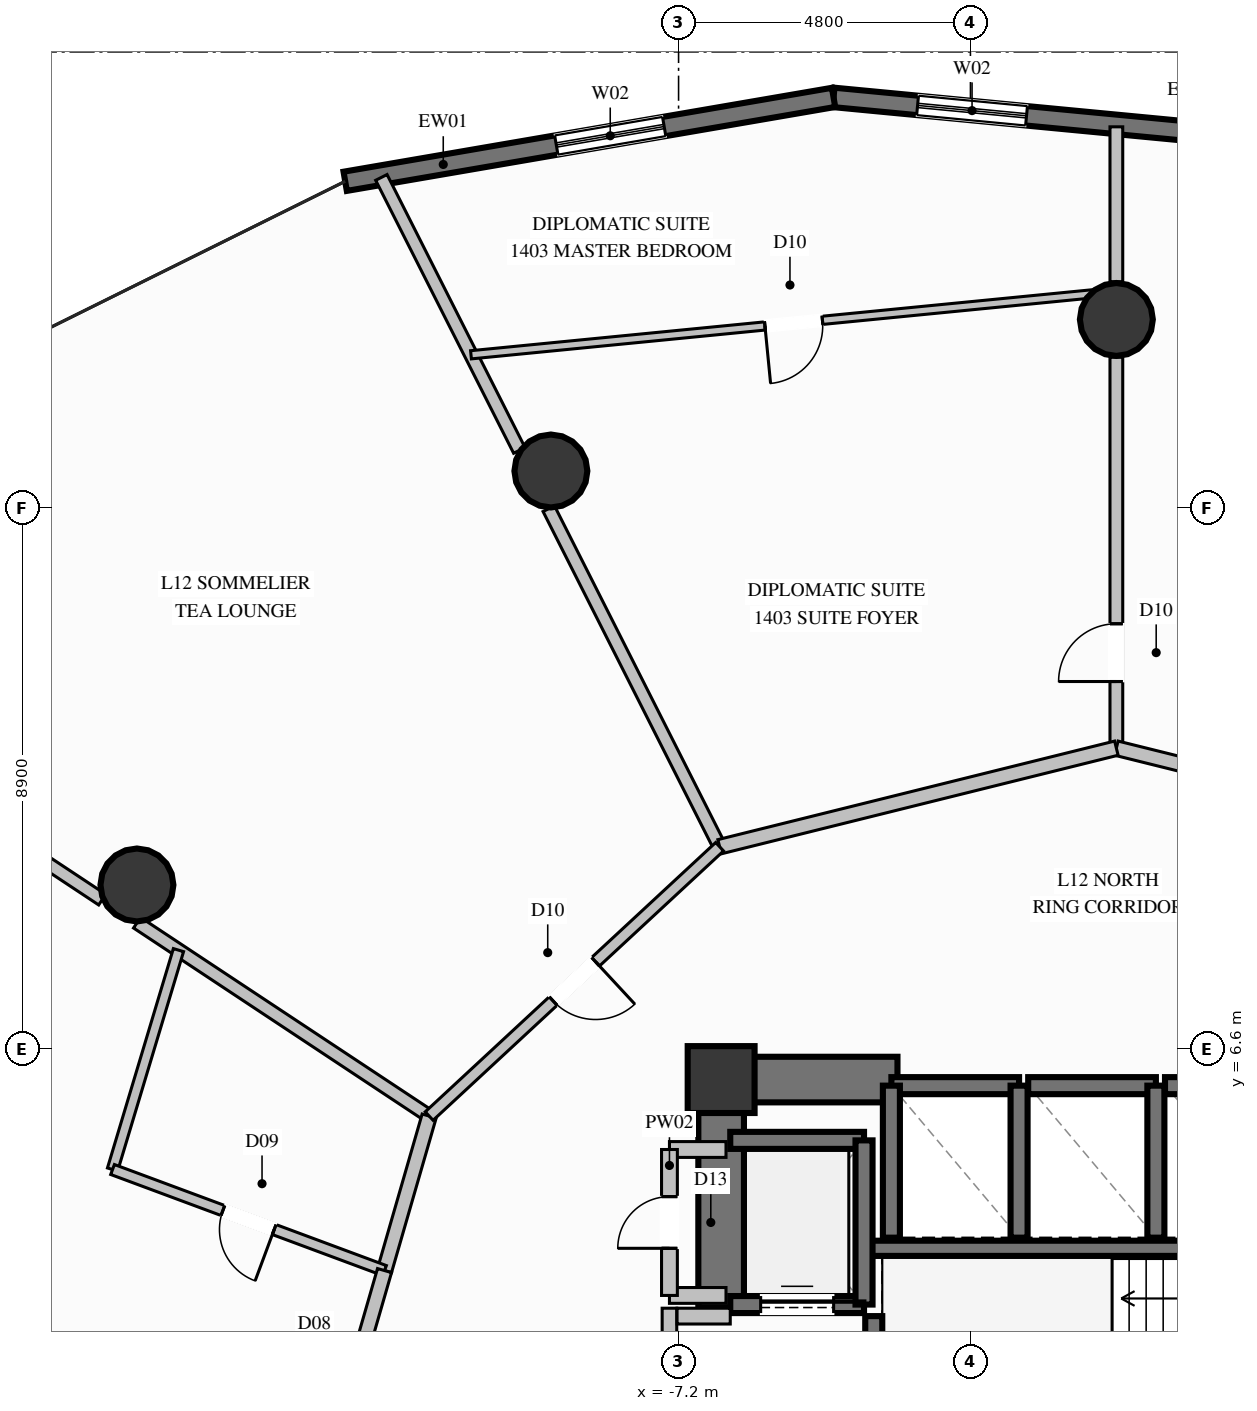
"""IFC4 building model, lengths in metres.
Left out: names, types, materials, properties, quantities, classifications, styles, units other than length and angle.
Written with IfcOpenShell. Run it as: python <this file> out.ifc"""

import sys

from ifc_helpers import new_model, si_unit, direction, frame, frame_2d, origin, origin_2d, place, context, subcontext, project, spatial, rectangle, circle, extrude, element, fill, save


model = new_model("IFC4")
c1 = context("Model", 3, precision=1e-05, world=origin(), true_north=direction((0.0, 1.0)))
c2 = subcontext(c1, "Body", "Model", "MODEL_VIEW")
j1 = project(units=[si_unit("LENGTHUNIT", "METRE"), si_unit("PLANEANGLEUNIT", "RADIAN")], contexts=[c1])
p1 = place(None, origin())
s1 = spatial("IfcSite", under=j1, at=p1, CompositionType="ELEMENT")
p2 = place(p1, origin())
s2 = spatial("IfcBuilding", under=s1, at=p2, CompositionType="ELEMENT")
p3 = place(p2, frame((0.0, 0.0, 53.6)))
s3 = spatial("IfcBuildingStorey", under=s2, at=p3, CompositionType="ELEMENT", Elevation=53.6)
p4 = place(p3, frame((-6.5, 6.1, 0.0), z_axis=(0.0, 0.0, 1.0), x_axis=(1.0, 0.0, 0.0)))
e1 = element("IfcColumn", 1, at=p4, inside=s3, PredefinedType="COLUMN", context=c2, shape_type="SweptSolid", body=[
    extrude(rectangle(XDim=1.1, YDim=1.1, at=origin_2d()), origin(), (0.0, 0.0, 1.0), 3.6),
])
p5 = place(p3, frame((-4.13, 3.325, 0.0), z_axis=(0.0, 0.0, 1.0), x_axis=(1.0, 0.0, 0.0)))
e2 = element("IfcWall", 2, at=p5, inside=s3, PredefinedType="SOLIDWALL", context=c2, shape_type="SweptSolid", body=[
    extrude(rectangle(XDim=8.26, YDim=0.25, at=frame_2d((4.13, 0.0))), origin(), (0.0, 0.0, 1.0), 3.6),
])
p6 = place(p3, frame((-6.125, 6.1, 0.0), z_axis=(0.0, 0.0, 1.0), x_axis=(1.0, 0.0, 0.0)))
e3 = element("IfcWall", 3, at=p6, inside=s3, PredefinedType="SHEAR", context=c2, shape_type="SweptSolid", body=[
    extrude(rectangle(XDim=2.525, YDim=0.75, at=frame_2d((1.262, 0.0))), origin(), (0.0, 0.0, 1.0), 3.6),
])
p7 = place(p3, frame((-6.5, 2.35, 0.0), z_axis=(0.0, 0.0, 1.0), x_axis=(0.0, 1.0, 0.0)))
e4 = element("IfcWall", 4, at=p7, inside=s3, PredefinedType="SHEAR", context=c2, shape_type="SweptSolid", body=[
    extrude(rectangle(XDim=4.125, YDim=0.75, at=frame_2d((2.062, 0.0))), origin(), (0.0, 0.0, 1.0), 3.6),
])
for number, where, z_axis, x_axis in (
    (5, (0.0, 18.6, 0.0), (0.0, 0.0, 1.0), (1.0, 0.0, 0.0)),
    (6, (-9.3, 16.108, 0.0), (0.0, 0.0, 1.0), (1.0, 0.0, 0.0)),
    (7, (-16.108, 9.3, 0.0), (0.0, 0.0, 1.0), (1.0, 0.0, 0.0)),
):
    element("IfcColumn", number, at=place(p3, frame(where, z_axis=z_axis, x_axis=x_axis)), inside=s3, PredefinedType="COLUMN", context=c2, shape_type="SweptSolid", body=[
        extrude(circle(Radius=0.6, at=origin_2d()), origin(), (0.0, 0.0, 1.0), 3.6),
    ])
p8 = place(p3, frame((-4.651, 22.252, 0.0), z_axis=(0.0, 0.0, 1.0), x_axis=(0.995479154881, -0.094980272677, 0.0)))
e8 = element("IfcWall", 8, at=p8, inside=s3, PredefinedType="SOLIDWALL", context=c2, shape_type="SweptSolid", body=[
    extrude(rectangle(XDim=8.413, YDim=0.32, at=frame_2d((4.207, 0.0))), origin(), (0.0, 0.0, 1.0), 3.34),
])
p9 = place(p8, frame((1.388, 0.0, 0.35)))
e9 = element("IfcOpeningElement", 9, at=p9, cuts=e8, PredefinedType="OPENING", context=c2, shape_type="SweptSolid", body=[
    extrude(rectangle(XDim=1.8, YDim=2.6, at=frame_2d((0.9, 1.3))), frame((0.0, 0.17, 0.0), z_axis=(0.0, -1.0, 0.0), x_axis=(1.0, 0.0, 0.0)), (0.0, 0.0, 1.0), 0.34),
])
p10 = place(p3, frame((-12.683, 20.872, 0.0), z_axis=(0.0, 0.0, 1.0), x_axis=(0.985562327857, 0.16931301754, 0.0)))
e10 = element("IfcWall", 10, at=p10, inside=s3, PredefinedType="SOLIDWALL", context=c2, shape_type="SweptSolid", body=[
    extrude(rectangle(XDim=8.15, YDim=0.32, at=frame_2d((4.075, 0.0))), origin(), (0.0, 0.0, 1.0), 3.34),
])
p11 = place(p10, frame((3.523, 0.0, 0.35)))
e11 = element("IfcOpeningElement", 11, at=p11, cuts=e10, PredefinedType="OPENING", context=c2, shape_type="SweptSolid", body=[
    extrude(rectangle(XDim=1.8, YDim=2.6, at=frame_2d((0.9, 1.3))), frame((0.0, 0.17, 0.0), z_axis=(0.0, -1.0, 0.0), x_axis=(1.0, 0.0, 0.0)), (0.0, 0.0, 1.0), 0.34),
])
p12 = place(p3, frame((-1.6, 6.0, 0.0), z_axis=(0.0, 0.0, 1.0), x_axis=(-1.0, 0.0, 0.0)))
e12 = element("IfcWall", 12, at=p12, inside=s3, PredefinedType="SOLIDWALL", context=c2, shape_type="SweptSolid", body=[
    extrude(rectangle(XDim=2.1, YDim=0.28, at=frame_2d((1.05, 0.0))), origin(), (0.0, 0.0, 1.0), 3.34),
])
for number, where, z_axis, x_axis in (
    (13, (-3.7, 6.0, 0.0), (0.0, 0.0, 1.0), (0.0, -1.0, 0.0)),
    (14, (-1.6, 3.5, 0.0), (0.0, 0.0, 1.0), (0.0, 1.0, 0.0)),
):
    element("IfcWall", number, at=place(p3, frame(where, z_axis=z_axis, x_axis=x_axis)), inside=s3, PredefinedType="SOLIDWALL", context=c2, shape_type="SweptSolid", body=[
        extrude(rectangle(XDim=2.5, YDim=0.28, at=frame_2d((1.25, 0.0))), origin(), (0.0, 0.0, 1.0), 3.34),
    ])
p13 = place(p3, frame((0.65, 6.0, 0.0), z_axis=(0.0, 0.0, 1.0), x_axis=(-1.0, 0.0, 0.0)))
e15 = element("IfcWall", 15, at=p13, inside=s3, PredefinedType="SOLIDWALL", context=c2, shape_type="SweptSolid", body=[
    extrude(rectangle(XDim=2.1, YDim=0.28, at=frame_2d((1.05, 0.0))), origin(), (0.0, 0.0, 1.0), 3.34),
])
p14 = place(p3, frame((0.65, 3.5, 0.0), z_axis=(0.0, 0.0, 1.0), x_axis=(0.0, 1.0, 0.0)))
e16 = element("IfcWall", 16, at=p14, inside=s3, PredefinedType="SOLIDWALL", context=c2, shape_type="SweptSolid", body=[
    extrude(rectangle(XDim=2.5, YDim=0.28, at=frame_2d((1.25, 0.0))), origin(), (0.0, 0.0, 1.0), 3.34),
])
p15 = place(p3, frame((3.0, 6.0, 0.0), z_axis=(0.0, 0.0, 1.0), x_axis=(-1.0, 0.0, 0.0)))
e17 = element("IfcWall", 17, at=p15, inside=s3, PredefinedType="SOLIDWALL", context=c2, shape_type="SweptSolid", body=[
    extrude(rectangle(XDim=2.2, YDim=0.28, at=frame_2d((1.1, 0.0))), origin(), (0.0, 0.0, 1.0), 3.34),
])
p16 = place(p3, frame((-6.35, 2.4, 0.0), z_axis=(0.0, 0.0, 1.0), x_axis=(1.0, 0.0, 0.0)))
e18 = element("IfcWall", 18, at=p16, inside=s3, PredefinedType="SOLIDWALL", context=c2, shape_type="SweptSolid", body=[
    extrude(rectangle(XDim=2.2, YDim=0.28, at=frame_2d((1.1, 0.0))), origin(), (0.0, 0.0, 1.0), 3.34),
])
p17 = place(p16, frame((0.5, 0.0, 0.0)))
e19 = element("IfcOpeningElement", 19, at=p17, cuts=e18, PredefinedType="OPENING", context=c2, shape_type="SweptSolid", body=[
    extrude(rectangle(XDim=1.2, YDim=2.2, at=frame_2d((0.6, 1.1))), frame((0.0, 0.15, 0.0), z_axis=(0.0, -1.0, 0.0), x_axis=(1.0, 0.0, 0.0)), (0.0, 0.0, 1.0), 0.3),
])
p18 = place(p3, frame((-4.15, 5.1, 0.0), z_axis=(0.0, 0.0, 1.0), x_axis=(-1.0, 0.0, 0.0)))
e20 = element("IfcWall", 20, at=p18, inside=s3, PredefinedType="SOLIDWALL", context=c2, shape_type="SweptSolid", body=[
    extrude(rectangle(XDim=2.2, YDim=0.28, at=frame_2d((1.1, 0.0))), origin(), (0.0, 0.0, 1.0), 3.34),
])
p19 = place(p3, frame((-4.15, 2.4, 0.0), z_axis=(0.0, 0.0, 1.0), x_axis=(0.0, 1.0, 0.0)))
e21 = element("IfcWall", 21, at=p19, inside=s3, PredefinedType="SOLIDWALL", context=c2, shape_type="SweptSolid", body=[
    extrude(rectangle(XDim=2.7, YDim=0.28, at=frame_2d((1.35, 0.0))), origin(), (0.0, 0.0, 1.0), 3.34),
])
p20 = place(p3, frame((-3.99, -3.25, 0.0), z_axis=(0.0, 0.0, 1.0), x_axis=(0.0, 1.0, 0.0)))
e22 = element("IfcWall", 22, at=p20, inside=s3, PredefinedType="SOLIDWALL", context=c2, shape_type="SweptSolid", body=[
    extrude(rectangle(XDim=5.46, YDim=0.28, at=frame_2d((2.73, 0.0))), origin(), (0.0, 0.0, 1.0), 3.34),
])
p21 = place(p20, frame((0.937, 0.0, 0.0)))
e23 = element("IfcOpeningElement", 23, at=p21, cuts=e22, PredefinedType="OPENING", context=c2, shape_type="SweptSolid", body=[
    extrude(rectangle(XDim=1.2, YDim=2.2, at=frame_2d((0.6, 1.1))), frame((0.0, 0.15, 0.0), z_axis=(0.0, -1.0, 0.0), x_axis=(1.0, 0.0, 0.0)), (0.0, 0.0, 1.0), 0.3),
])
p22 = place(p3, frame((-7.35, -3.38, 0.0), z_axis=(0.0, 0.0, 1.0), x_axis=(0.0, 1.0, 0.0)))
e24 = element("IfcWall", 24, at=p22, inside=s3, PredefinedType="PARTITIONING", context=c2, shape_type="SweptSolid", body=[
    extrude(rectangle(XDim=5.72, YDim=0.24, at=frame_2d((2.86, 0.0))), origin(), (0.0, 0.0, 1.0), 2.425),
])
p23 = place(p22, frame((1.599, 0.0, 0.0)))
e25 = element("IfcOpeningElement", 25, at=p23, cuts=e24, PredefinedType="OPENING", context=c2, shape_type="SweptSolid", body=[
    extrude(rectangle(XDim=1.15, YDim=2.2, at=frame_2d((0.575, 1.1))), frame((0.0, 0.13, 0.0), z_axis=(0.0, -1.0, 0.0), x_axis=(1.0, 0.0, 0.0)), (0.0, 0.0, 1.0), 0.26),
])
p24 = place(p3, frame((-7.225, 2.21, 0.0), z_axis=(0.0, 0.0, 1.0), x_axis=(1.0, 0.0, 0.0)))
e26 = element("IfcWall", 26, at=p24, inside=s3, PredefinedType="PARTITIONING", context=c2, shape_type="SweptSolid", body=[
    extrude(rectangle(XDim=0.875, YDim=0.26, at=frame_2d((0.438, 0.0))), origin(), (0.0, 0.0, 1.0), 3.34),
])
for number, where, z_axis, x_axis in (
    (27, (-7.35, 4.95, 0.0), (0.0, 0.0, 1.0), (1.0, 0.0, 0.0)),
    (28, (-7.35, 2.55, 0.0), (0.0, 0.0, 1.0), (1.0, 0.0, 0.0)),
):
    element("IfcWall", number, at=place(p3, frame(where, z_axis=z_axis, x_axis=x_axis)), inside=s3, PredefinedType="PARTITIONING", context=c2, shape_type="SweptSolid", body=[
        extrude(rectangle(XDim=0.93, YDim=0.26, at=frame_2d((0.465, 0.0))), origin(), (0.0, 0.0, 1.0), 3.34),
    ])
p25 = place(p3, frame((-7.35, 2.55, 0.0), z_axis=(0.0, 0.0, 1.0), x_axis=(0.0, 1.0, 0.0)))
e29 = element("IfcWall", 29, at=p25, inside=s3, PredefinedType="PARTITIONING", context=c2, shape_type="SweptSolid", body=[
    extrude(rectangle(XDim=2.4, YDim=0.26, at=frame_2d((1.2, 0.0))), origin(), (0.0, 0.0, 1.0), 2.425),
])
p26 = place(p25, frame((0.775, 0.0, 0.0)))
e30 = element("IfcOpeningElement", 30, at=p26, cuts=e29, PredefinedType="OPENING", context=c2, shape_type="SweptSolid", body=[
    extrude(rectangle(XDim=0.85, YDim=2.05, at=frame_2d((0.425, 1.025))), frame((0.0, 0.14, 0.0), z_axis=(0.0, -1.0, 0.0), x_axis=(1.0, 0.0, 0.0)), (0.0, 0.0, 1.0), 0.28),
])
p27 = place(p3, frame((0.0, 11.55, 0.0), z_axis=(0.0, 0.0, 1.0), x_axis=(0.0, 1.0, 0.0)))
e31 = element("IfcWall", 31, at=p27, inside=s3, PredefinedType="PARTITIONING", context=c2, shape_type="SweptSolid", body=[
    extrude(rectangle(XDim=6.43, YDim=0.21, at=frame_2d((3.215, 0.0))), origin(), (0.0, 0.0, 1.0), 2.709),
])
p28 = place(p27, frame((1.096, 0.0, 0.0)))
e32 = element("IfcOpeningElement", 32, at=p28, cuts=e31, PredefinedType="OPENING", context=c2, shape_type="SweptSolid", body=[
    extrude(rectangle(XDim=0.95, YDim=2.1, at=frame_2d((0.475, 1.05))), frame((0.0, 0.115, 0.0), z_axis=(0.0, -1.0, 0.0), x_axis=(1.0, 0.0, 0.0)), (0.0, 0.0, 1.0), 0.23),
])
p29 = place(p3, frame((0.0, 19.22, 0.0), z_axis=(0.0, 0.0, 1.0), x_axis=(0.0, 1.0, 0.0)))
e33 = element("IfcWall", 33, at=p29, inside=s3, PredefinedType="PARTITIONING", context=c2, shape_type="SweptSolid", body=[
    extrude(rectangle(XDim=2.548, YDim=0.21, at=frame_2d((1.274, 0.0))), origin(), (0.0, 0.0, 1.0), 3.34),
])
p30 = place(p3, frame((-6.525, 9.929, 0.0), z_axis=(0.0, 0.0, 1.0), x_axis=(-0.451065638839, 0.89249077836, 0.0)))
e34 = element("IfcWall", 34, at=p30, inside=s3, PredefinedType="PARTITIONING", context=c2, shape_type="SweptSolid", body=[
    extrude(rectangle(XDim=6.23, YDim=0.21, at=frame_2d((3.115, 0.0))), origin(), (0.0, 0.0, 1.0), 2.709),
])
p31 = place(p3, frame((-9.819, 16.447, 0.0), z_axis=(0.0, 0.0, 1.0), x_axis=(-0.451073129045, 0.892486992764, 0.0)))
e35 = element("IfcWall", 35, at=p31, inside=s3, PredefinedType="PARTITIONING", context=c2, shape_type="SweptSolid", body=[
    extrude(rectangle(XDim=5.03, YDim=0.21, at=frame_2d((2.515, 0.0))), origin(), (0.0, 0.0, 1.0), 3.34),
])
p32 = place(p3, frame((-11.302, 5.5, 0.0), z_axis=(0.0, 0.0, 1.0), x_axis=(-0.833864799367, 0.551968745833, 0.0)))
e36 = element("IfcWall", 36, at=p32, inside=s3, PredefinedType="PARTITIONING", context=c2, shape_type="SweptSolid", body=[
    extrude(rectangle(XDim=5.761, YDim=0.21, at=frame_2d((2.88, 0.0))), origin(), (0.0, 0.0, 1.0), 2.709),
])
p33 = place(p3, frame((-16.679, 9.059, 0.0), z_axis=(0.0, 0.0, 1.0), x_axis=(-0.833869330646, 0.551961900324, 0.0)))
e37 = element("IfcWall", 37, at=p33, inside=s3, PredefinedType="PARTITIONING", context=c2, shape_type="SweptSolid", body=[
    extrude(rectangle(XDim=8.095, YDim=0.21, at=frame_2d((4.047, 0.0))), origin(), (0.0, 0.0, 1.0), 3.34),
])
p34 = place(p3, frame((-11.302, 5.5, 0.0), z_axis=(0.0, 0.0, 1.0), x_axis=(-0.277475281216, -0.960732776746, 0.0)))
e38 = element("IfcWall", 38, at=p34, inside=s3, PredefinedType="PARTITIONING", context=c2, shape_type="SweptSolid", body=[
    extrude(rectangle(XDim=2.645, YDim=0.24, at=frame_2d((1.322, 0.0))), origin(), (0.0, 0.0, 1.0), 3.34),
])
p35 = place(p3, frame((-15.425, 8.229, 0.0), z_axis=(0.0, 0.0, 1.0), x_axis=(-0.287740266974, -0.957708483184, 0.0)))
e39 = element("IfcWall", 39, at=p35, inside=s3, PredefinedType="PLUMBINGWALL", context=c2, shape_type="SweptSolid", body=[
    extrude(rectangle(XDim=3.767, YDim=0.175, at=frame_2d((1.884, 0.0))), origin(), (0.0, 0.0, 1.0), 3.34),
])
p36 = place(p3, frame((-12.036, 2.959, 0.0), z_axis=(0.0, 0.0, 1.0), x_axis=(-0.937380415371, 0.348307273652, 0.0)))
e40 = element("IfcWall", 40, at=p36, inside=s3, PredefinedType="PLUMBINGWALL", context=c2, shape_type="SweptSolid", body=[
    extrude(rectangle(XDim=4.772, YDim=0.175, at=frame_2d((2.386, 0.0))), origin(), (0.0, 0.0, 1.0), 3.34),
])
p37 = place(p36, frame((1.936, 0.0, 0.0)))
e41 = element("IfcOpeningElement", 41, at=p37, cuts=e40, PredefinedType="OPENING", context=c2, shape_type="SweptSolid", body=[
    extrude(rectangle(XDim=0.9, YDim=2.1, at=frame_2d((0.45, 1.05))), frame((0.0, 0.098, 0.0), z_axis=(0.0, -1.0, 0.0), x_axis=(1.0, 0.0, 0.0)), (0.0, 0.0, 1.0), 0.195),
])
p38 = place(p3, frame((-12.036, 2.959, 0.0), z_axis=(0.0, 0.0, 1.0), x_axis=(-0.277650694477, -0.960682097187, 0.0)))
e42 = element("IfcWall", 42, at=p38, inside=s3, PredefinedType="PARTITIONING", context=c2, shape_type="SweptSolid", body=[
    extrude(rectangle(XDim=3.653, YDim=0.24, at=frame_2d((1.826, 0.0))), origin(), (0.0, 0.0, 1.0), 3.34),
])
p39 = place(p38, frame((1.276, 0.0, 0.0)))
e43 = element("IfcOpeningElement", 43, at=p39, cuts=e42, PredefinedType="OPENING", context=c2, shape_type="SweptSolid", body=[
    extrude(rectangle(XDim=1.1, YDim=2.3, at=frame_2d((0.55, 1.15))), frame((0.0, 0.13, 0.0), z_axis=(0.0, -1.0, 0.0), x_axis=(1.0, 0.0, 0.0)), (0.0, 0.0, 1.0), 0.26),
])
for number, where, z_axis, x_axis in (
    (44, (6.525, 9.929, 0.0), (0.0, 0.0, 1.0), (-0.97, 0.241, 0.0)),
    (45, (0.0, 11.55, 0.0), (0.0, 0.0, 1.0), (-0.97, -0.241, 0.0)),
):
    element("IfcWall", number, at=place(p3, frame(where, z_axis=z_axis, x_axis=x_axis)), inside=s3, PredefinedType="PARTITIONING", context=c2, shape_type="SweptSolid", body=[
        extrude(rectangle(XDim=6.723, YDim=0.24, at=frame_2d((3.362, 0.0))), origin(), (0.0, 0.0, 1.0), 3.34),
    ])
p40 = place(p3, frame((0.0, 19.06, 0.0), z_axis=(0.0, 0.0, 1.0), x_axis=(-0.995224645092, -0.097610992218, 0.0)))
e46 = element("IfcWall", 46, at=p40, inside=s3, PredefinedType="PARTITIONING", context=c2, shape_type="SweptSolid", body=[
    extrude(rectangle(XDim=10.665, YDim=0.135, at=frame_2d((5.333, 0.0))), origin(), (0.0, 0.0, 1.0), 2.792),
])
p41 = place(p40, frame((4.857, 0.0, 0.0)))
e47 = element("IfcOpeningElement", 47, at=p41, cuts=e46, PredefinedType="OPENING", context=c2, shape_type="SweptSolid", body=[
    extrude(rectangle(XDim=0.95, YDim=2.1, at=frame_2d((0.475, 1.05))), frame((0.0, 0.078, 0.0), z_axis=(0.0, -1.0, 0.0), x_axis=(1.0, 0.0, 0.0)), (0.0, 0.0, 1.0), 0.155),
])
p42 = place(p3, frame((-6.525, 9.929, 0.0), z_axis=(0.0, 0.0, 1.0), x_axis=(-0.733323191675, -0.679880207501, 0.0)))
e48 = element("IfcWall", 48, at=p42, inside=s3, PredefinedType="PARTITIONING", context=c2, shape_type="SweptSolid", body=[
    extrude(rectangle(XDim=6.514, YDim=0.19, at=frame_2d((3.257, 0.0))), origin(), (0.0, 0.0, 1.0), 3.34),
])
p43 = place(p42, frame((2.782, 0.0, 0.0)))
e49 = element("IfcOpeningElement", 49, at=p43, cuts=e48, PredefinedType="OPENING", context=c2, shape_type="SweptSolid", body=[
    extrude(rectangle(XDim=0.95, YDim=2.1, at=frame_2d((0.475, 1.05))), frame((0.0, 0.105, 0.0), z_axis=(0.0, -1.0, 0.0), x_axis=(1.0, 0.0, 0.0)), (0.0, 0.0, 1.0), 0.21),
])
p44 = place(p9, origin())
e50 = element("IfcWindow", 50, at=p44, inside=s3, PartitioningType="SINGLE_PANEL", PredefinedType="WINDOW", context=c2, shape_type="SweptSolid", body=[
    extrude(rectangle(XDim=1.8, YDim=2.6, at=frame_2d((0.9, 1.3))), frame((0.0, 0.03, 0.0), z_axis=(0.0, -1.0, 0.0), x_axis=(1.0, 0.0, 0.0)), (0.0, 0.0, 1.0), 0.06),
])
fill(e9, e50)
p45 = place(p11, origin())
e51 = element("IfcWindow", 51, at=p45, inside=s3, PartitioningType="SINGLE_PANEL", PredefinedType="WINDOW", context=c2, shape_type="SweptSolid", body=[
    extrude(rectangle(XDim=1.8, YDim=2.6, at=frame_2d((0.9, 1.3))), frame((0.0, 0.03, 0.0), z_axis=(0.0, -1.0, 0.0), x_axis=(1.0, 0.0, 0.0)), (0.0, 0.0, 1.0), 0.06),
])
fill(e11, e51)
p46 = place(p17, origin())
e52 = element("IfcDoor", 52, at=p46, inside=s3, OperationType="SLIDING_TO_LEFT", PredefinedType="DOOR", context=c2, shape_type="SweptSolid", body=[
    extrude(rectangle(XDim=1.2, YDim=2.2, at=frame_2d((0.6, 1.1))), frame((0.0, 0.025, 0.0), z_axis=(0.0, -1.0, 0.0), x_axis=(1.0, 0.0, 0.0)), (0.0, 0.0, 1.0), 0.05),
])
fill(e19, e52)
p47 = place(p26, origin())
e53 = element("IfcDoor", 53, at=p47, inside=s3, OperationType="SINGLE_SWING_LEFT", PredefinedType="DOOR", context=c2, shape_type="SweptSolid", body=[
    extrude(rectangle(XDim=0.85, YDim=2.05, at=frame_2d((0.425, 1.025))), frame((0.0, 0.025, 0.0), z_axis=(0.0, -1.0, 0.0), x_axis=(1.0, 0.0, 0.0)), (0.0, 0.0, 1.0), 0.05),
])
fill(e30, e53)
p48 = place(p37, origin())
e54 = element("IfcDoor", 54, at=p48, inside=s3, OperationType="SINGLE_SWING_LEFT", PredefinedType="DOOR", context=c2, shape_type="SweptSolid", body=[
    extrude(rectangle(XDim=0.9, YDim=2.1, at=frame_2d((0.45, 1.05))), frame((0.0, 0.025, 0.0), z_axis=(0.0, -1.0, 0.0), x_axis=(1.0, 0.0, 0.0)), (0.0, 0.0, 1.0), 0.05),
])
fill(e41, e54)
p49 = place(p28, origin())
e55 = element("IfcDoor", 55, at=p49, inside=s3, OperationType="SINGLE_SWING_LEFT", PredefinedType="DOOR", context=c2, shape_type="SweptSolid", body=[
    extrude(rectangle(XDim=0.95, YDim=2.1, at=frame_2d((0.475, 1.05))), frame((0.0, 0.025, 0.0), z_axis=(0.0, -1.0, 0.0), x_axis=(1.0, 0.0, 0.0)), (0.0, 0.0, 1.0), 0.05),
])
fill(e32, e55)
p50 = place(p41, origin())
e56 = element("IfcDoor", 56, at=p50, inside=s3, OperationType="SINGLE_SWING_RIGHT", PredefinedType="DOOR", context=c2, shape_type="SweptSolid", body=[
    extrude(rectangle(XDim=0.95, YDim=2.1, at=frame_2d((0.475, 1.05))), frame((0.0, 0.025, 0.0), z_axis=(0.0, -1.0, 0.0), x_axis=(1.0, 0.0, 0.0)), (0.0, 0.0, 1.0), 0.05),
])
fill(e47, e56)
p51 = place(p43, origin())
e57 = element("IfcDoor", 57, at=p51, inside=s3, OperationType="SINGLE_SWING_LEFT", PredefinedType="DOOR", context=c2, shape_type="SweptSolid", body=[
    extrude(rectangle(XDim=0.95, YDim=2.1, at=frame_2d((0.475, 1.05))), frame((0.0, 0.025, 0.0), z_axis=(0.0, -1.0, 0.0), x_axis=(1.0, 0.0, 0.0)), (0.0, 0.0, 1.0), 0.05),
])
fill(e49, e57)
save(model, sys.argv[1])
